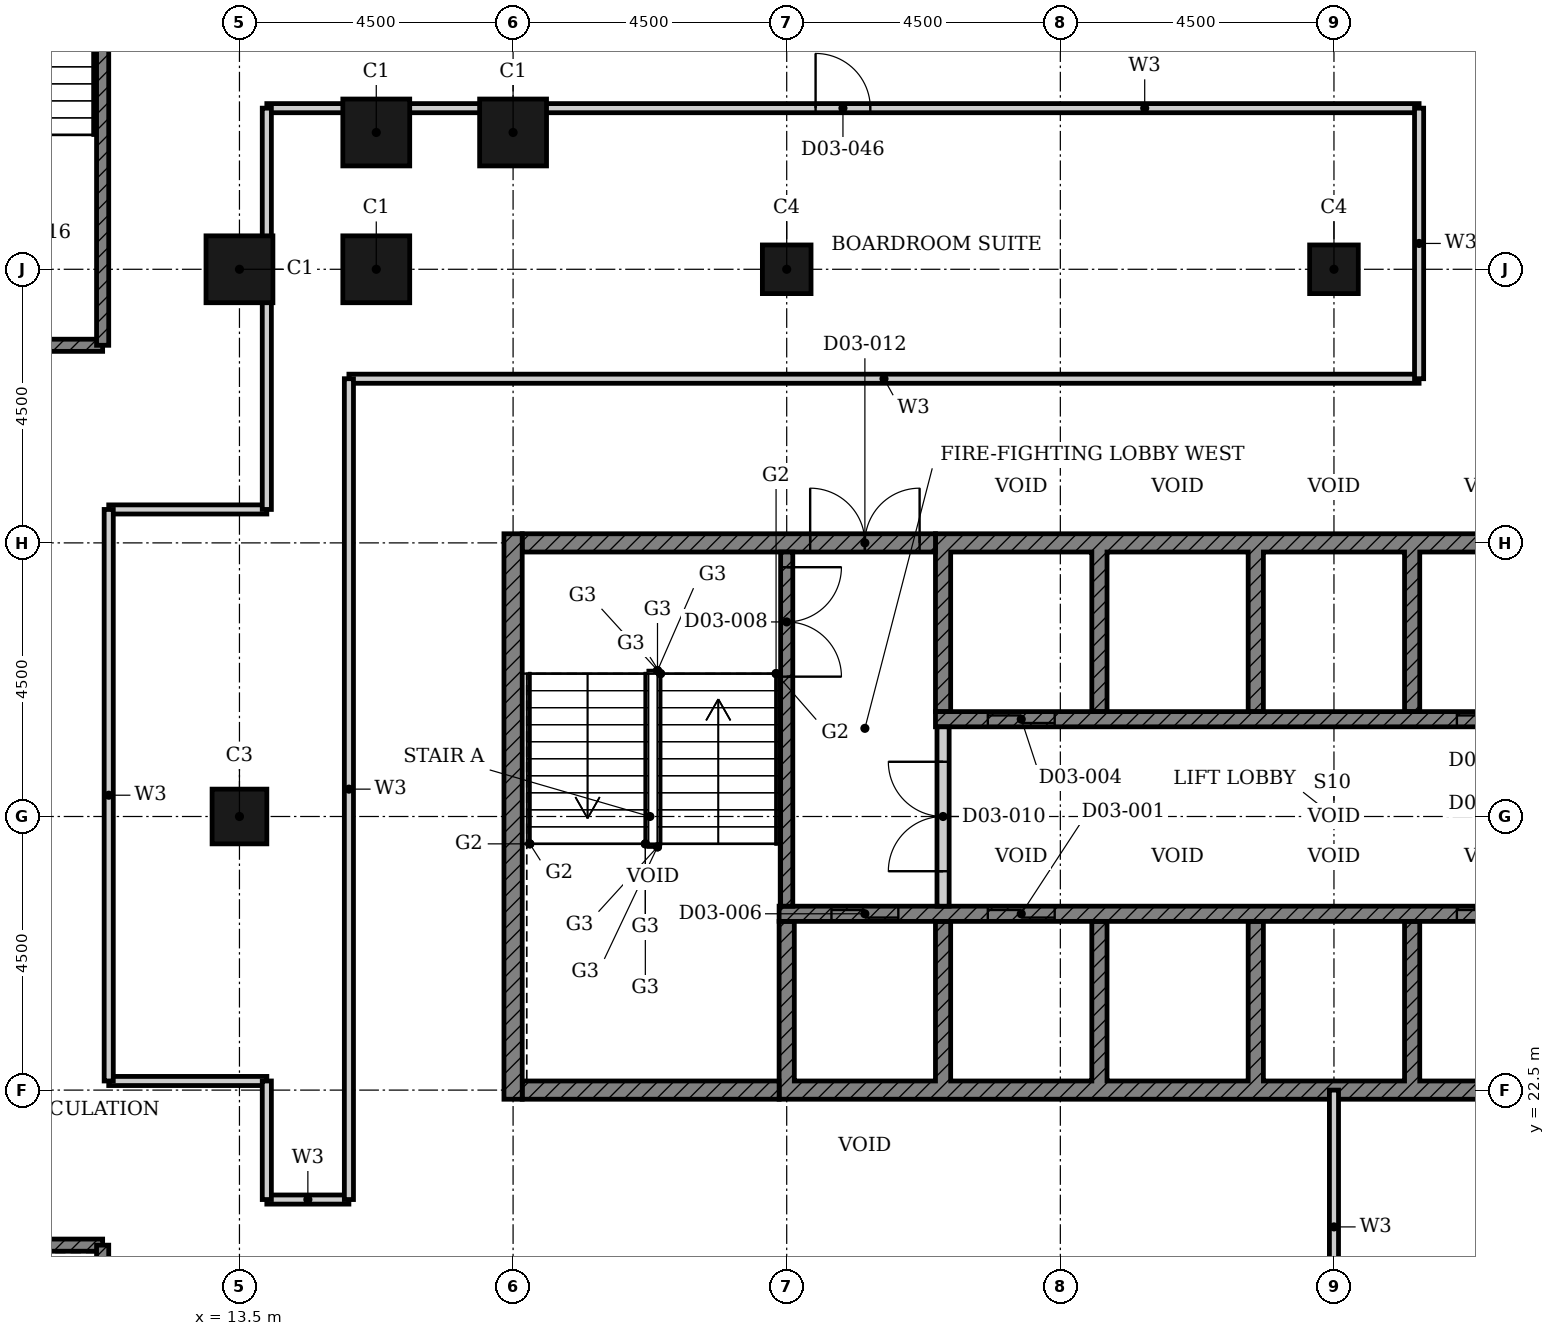
"""IFC4 building model, lengths in metres.
Left out: names, types, materials, properties, quantities, classifications, styles, units other than length and angle.
Written with IfcOpenShell. Run it as: python <this file> out.ifc"""

import sys

from ifc_helpers import new_model, si_unit, direction, frame, frame_2d, origin, origin_2d, place, context, subcontext, project, spatial, polyline, rectangle, hollow_rectangle, outline, extrude, element, fill, save


model = new_model("IFC4")
c1 = context("Model", 3, precision=1e-05, world=origin(), true_north=direction((0.0, 1.0)))
c2 = subcontext(c1, "Body", "Model", "MODEL_VIEW")
j1 = project(units=[si_unit("LENGTHUNIT", "METRE"), si_unit("PLANEANGLEUNIT", "RADIAN")], contexts=[c1])
p1 = place(None, origin())
s1 = spatial("IfcSite", under=j1, at=p1, CompositionType="ELEMENT")
p2 = place(p1, origin())
s2 = spatial("IfcBuilding", under=s1, at=p2, CompositionType="ELEMENT")
p3 = place(p2, frame((0.0, 0.0, 17.4)))
s3 = spatial("IfcBuildingStorey", under=s2, at=p3, CompositionType="ELEMENT", Elevation=17.4)
for number, where, z_axis, x_axis in (
    (1, (18.0, 38.25, 0.0), (0.0, 0.0, 1.0), (1.0, 0.0, 0.0)),
    (2, (15.75, 38.25, 0.0), (0.0, 0.0, 1.0), (1.0, 0.0, 0.0)),
    (3, (15.75, 36.0, 0.0), (0.0, 0.0, 1.0), (1.0, 0.0, 0.0)),
    (4, (13.5, 36.0, 0.0), (0.0, 0.0, 1.0), (1.0, 0.0, 0.0)),
):
    element("IfcColumn", number, at=place(p3, frame(where, z_axis=z_axis, x_axis=x_axis)), inside=s3, PredefinedType="COLUMN", context=c2, shape_type="SweptSolid", body=[
        extrude(hollow_rectangle(XDim=1.1, YDim=1.1, WallThickness=0.036, at=origin_2d()), origin(), (0.0, 0.0, 1.0), 6.6),
    ])
p4 = place(p3, frame((13.5, 27.0, 0.0), z_axis=(0.0, 0.0, 1.0), x_axis=(1.0, 0.0, 0.0)))
e5 = element("IfcColumn", 5, at=p4, inside=s3, PredefinedType="COLUMN", context=c2, shape_type="SweptSolid", body=[
    extrude(hollow_rectangle(XDim=0.9, YDim=0.9, WallThickness=0.028, at=origin_2d()), origin(), (0.0, 0.0, 1.0), 6.6),
])
for number, where, z_axis, x_axis in (
    (6, (22.5, 36.0, 0.0), (0.0, 0.0, 1.0), (1.0, 0.0, 0.0)),
    (7, (31.5, 36.0, 0.0), (0.0, 0.0, 1.0), (1.0, 0.0, 0.0)),
):
    element("IfcColumn", number, at=place(p3, frame(where, z_axis=z_axis, x_axis=x_axis)), inside=s3, PredefinedType="COLUMN", context=c2, shape_type="SweptSolid", body=[
        extrude(hollow_rectangle(XDim=0.8, YDim=0.8, WallThickness=0.025, at=origin_2d()), origin(), (0.0, 0.0, 1.0), 6.6),
    ])
p5 = place(p3, origin())
e8 = element("IfcWall", 8, at=p5, inside=s3, PredefinedType="SHEAR", context=c2, shape_type="SweptSolid", body=[
    extrude(outline(polyline([(22.375, 22.35), (38.053, 22.35), (38.053, 25.275), (37.803, 25.275), (37.803, 22.65), (35.482, 22.65), (35.482, 25.275), (35.232, 25.275), (35.232, 22.65), (32.911, 22.65), (32.911, 25.275), (32.661, 25.275), (32.661, 22.65), (30.339, 22.65), (30.339, 25.275), (30.089, 25.275), (30.089, 22.65), (27.768, 22.65), (27.768, 25.275), (27.518, 25.275), (27.518, 22.65), (25.197, 22.65), (25.197, 25.275), (24.947, 25.275), (24.947, 22.65), (22.625, 22.65), (22.625, 25.275), (22.375, 25.275), (22.375, 22.35)])), origin(), (0.0, 0.0, 1.0), 6.25),
])
p6 = place(p3, origin())
e9 = element("IfcWall", 9, at=p6, inside=s3, PredefinedType="SHEAR", context=c2, shape_type="SweptSolid", body=[
    extrude(outline(polyline([(24.947, 28.725), (25.197, 28.725), (25.197, 31.35), (27.518, 31.35), (27.518, 28.725), (27.768, 28.725), (27.768, 31.35), (30.089, 31.35), (30.089, 28.725), (30.339, 28.725), (30.339, 31.35), (32.661, 31.35), (32.661, 28.725), (32.911, 28.725), (32.911, 31.35), (35.232, 31.35), (35.232, 28.725), (35.482, 28.725), (35.482, 31.35), (37.803, 31.35), (37.803, 28.725), (38.053, 28.725), (38.053, 31.35), (40.375, 31.35), (40.375, 28.725), (40.625, 28.725), (40.625, 31.65), (24.947, 31.65), (24.947, 28.725)])), origin(), (0.0, 0.0, 1.0), 6.25),
])
p7 = place(p3, frame((18.15, 22.5, 0.0), z_axis=(0.0, 0.0, 1.0), x_axis=(1.0, 0.0, 0.0)))
e10 = element("IfcWall", 10, at=p7, inside=s3, PredefinedType="SHEAR", context=c2, shape_type="SweptSolid", body=[
    extrude(rectangle(XDim=4.225, YDim=0.3, at=frame_2d((2.113, 0.0))), origin(), (0.0, 0.0, 1.0), 6.25),
])
p8 = place(p3, frame((18.15, 31.5, 0.0), z_axis=(0.0, 0.0, 1.0), x_axis=(1.0, 0.0, 0.0)))
e11 = element("IfcWall", 11, at=p8, inside=s3, PredefinedType="SHEAR", context=c2, shape_type="SweptSolid", body=[
    extrude(rectangle(XDim=6.797, YDim=0.3, at=frame_2d((3.398, 0.0))), origin(), (0.0, 0.0, 1.0), 6.25),
])
p9 = place(p8, frame((4.736, 0.0, 0.0)))
e12 = element("IfcOpeningElement", 12, at=p9, cuts=e11, PredefinedType="OPENING", context=c2, shape_type="SweptSolid", body=[
    extrude(rectangle(XDim=1.8, YDim=2.1, at=frame_2d((0.9, 1.05))), frame((0.0, 0.16, 0.0), z_axis=(0.0, -1.0, 0.0), x_axis=(1.0, 0.0, 0.0)), (0.0, 0.0, 1.0), 0.32),
])
p10 = place(p3, frame((18.0, 22.35, 0.0), z_axis=(0.0, 0.0, 1.0), x_axis=(0.0, 1.0, 0.0)))
e13 = element("IfcWall", 13, at=p10, inside=s3, PredefinedType="SHEAR", context=c2, shape_type="SweptSolid", body=[
    extrude(rectangle(XDim=9.3, YDim=0.3, at=frame_2d((4.65, 0.0))), origin(), (0.0, 0.0, 1.0), 6.25),
])
p11 = place(p3, frame((22.375, 25.4, 0.0), z_axis=(0.0, 0.0, 1.0), x_axis=(1.0, 0.0, 0.0)))
e14 = element("IfcWall", 14, at=p11, inside=s3, PredefinedType="SHEAR", context=c2, shape_type="SweptSolid", body=[
    extrude(rectangle(XDim=15.678, YDim=0.25, at=frame_2d((7.839, 0.0))), origin(), (0.0, 0.0, 1.0), 6.25),
])
p12 = place(p11, frame((3.432, 0.0, 0.0)))
e15 = element("IfcOpeningElement", 15, at=p12, cuts=e14, PredefinedType="OPENING", context=c2, shape_type="SweptSolid", body=[
    extrude(rectangle(XDim=1.1, YDim=2.1, at=frame_2d((0.55, 1.05))), frame((0.0, 0.135, 0.0), z_axis=(0.0, -1.0, 0.0), x_axis=(1.0, 0.0, 0.0)), (0.0, 0.0, 1.0), 0.27),
])
p13 = place(p11, frame((11.146, 0.0, 0.0)))
e16 = element("IfcOpeningElement", 16, at=p13, cuts=e14, PredefinedType="OPENING", context=c2, shape_type="SweptSolid", body=[
    extrude(rectangle(XDim=1.1, YDim=2.1, at=frame_2d((0.55, 1.05))), frame((0.0, 0.135, 0.0), z_axis=(0.0, -1.0, 0.0), x_axis=(1.0, 0.0, 0.0)), (0.0, 0.0, 1.0), 0.27),
])
p14 = place(p11, frame((13.718, 0.0, 0.0)))
e17 = element("IfcOpeningElement", 17, at=p14, cuts=e14, PredefinedType="OPENING", context=c2, shape_type="SweptSolid", body=[
    extrude(rectangle(XDim=1.1, YDim=2.1, at=frame_2d((0.55, 1.05))), frame((0.0, 0.135, 0.0), z_axis=(0.0, -1.0, 0.0), x_axis=(1.0, 0.0, 0.0)), (0.0, 0.0, 1.0), 0.27),
])
p15 = place(p11, frame((0.861, 0.0, 0.0)))
e18 = element("IfcOpeningElement", 18, at=p15, cuts=e14, PredefinedType="OPENING", context=c2, shape_type="SweptSolid", body=[
    extrude(rectangle(XDim=1.1, YDim=2.1, at=frame_2d((0.55, 1.05))), frame((0.0, 0.135, 0.0), z_axis=(0.0, -1.0, 0.0), x_axis=(1.0, 0.0, 0.0)), (0.0, 0.0, 1.0), 0.27),
])
p16 = place(p3, frame((24.947, 28.6, 0.0), z_axis=(0.0, 0.0, 1.0), x_axis=(1.0, 0.0, 0.0)))
e19 = element("IfcWall", 19, at=p16, inside=s3, PredefinedType="SHEAR", context=c2, shape_type="SweptSolid", body=[
    extrude(rectangle(XDim=15.678, YDim=0.25, at=frame_2d((7.839, 0.0))), origin(), (0.0, 0.0, 1.0), 6.25),
])
p17 = place(p16, frame((0.861, 0.0, 0.0)))
e20 = element("IfcOpeningElement", 20, at=p17, cuts=e19, PredefinedType="OPENING", context=c2, shape_type="SweptSolid", body=[
    extrude(rectangle(XDim=1.1, YDim=2.1, at=frame_2d((0.55, 1.05))), frame((0.0, 0.135, 0.0), z_axis=(0.0, -1.0, 0.0), x_axis=(1.0, 0.0, 0.0)), (0.0, 0.0, 1.0), 0.27),
])
p18 = place(p16, frame((8.575, 0.0, 0.0)))
e21 = element("IfcOpeningElement", 21, at=p18, cuts=e19, PredefinedType="OPENING", context=c2, shape_type="SweptSolid", body=[
    extrude(rectangle(XDim=1.1, YDim=2.1, at=frame_2d((0.55, 1.05))), frame((0.0, 0.135, 0.0), z_axis=(0.0, -1.0, 0.0), x_axis=(1.0, 0.0, 0.0)), (0.0, 0.0, 1.0), 0.27),
])
p19 = place(p16, frame((13.718, 0.0, 0.0)))
e22 = element("IfcOpeningElement", 22, at=p19, cuts=e19, PredefinedType="OPENING", context=c2, shape_type="SweptSolid", body=[
    extrude(rectangle(XDim=1.1, YDim=2.1, at=frame_2d((0.55, 1.05))), frame((0.0, 0.135, 0.0), z_axis=(0.0, -1.0, 0.0), x_axis=(1.0, 0.0, 0.0)), (0.0, 0.0, 1.0), 0.27),
])
p20 = place(p3, frame((22.5, 31.35, 0.0), z_axis=(0.0, 0.0, 1.0), x_axis=(0.0, -1.0, 0.0)))
e23 = element("IfcWall", 23, at=p20, inside=s3, PredefinedType="SHEAR", context=c2, shape_type="SweptSolid", body=[
    extrude(rectangle(XDim=5.825, YDim=0.2, at=frame_2d((2.913, 0.0))), origin(), (0.0, 0.0, 1.0), 6.25),
])
p21 = place(p20, frame((0.25, 0.0, 0.0)))
e24 = element("IfcOpeningElement", 24, at=p21, cuts=e23, PredefinedType="OPENING", context=c2, shape_type="SweptSolid", body=[
    extrude(rectangle(XDim=1.8, YDim=2.1, at=frame_2d((0.9, 1.05))), frame((0.0, 0.11, 0.0), z_axis=(0.0, -1.0, 0.0), x_axis=(1.0, 0.0, 0.0)), (0.0, 0.0, 1.0), 0.22),
])
p22 = place(p3, frame((25.072, 25.525, 0.0), z_axis=(0.0, 0.0, 1.0), x_axis=(0.0, 1.0, 0.0)))
e25 = element("IfcWall", 25, at=p22, inside=s3, PredefinedType="PARTITIONING", context=c2, shape_type="SweptSolid", body=[
    extrude(rectangle(XDim=2.95, YDim=0.2, at=frame_2d((1.475, 0.0))), origin(), (0.0, 0.0, 1.0), 6.25),
])
p23 = place(p22, frame((0.575, 0.0, 0.0)))
e26 = element("IfcOpeningElement", 26, at=p23, cuts=e25, PredefinedType="OPENING", context=c2, shape_type="SweptSolid", body=[
    extrude(rectangle(XDim=1.8, YDim=2.1, at=frame_2d((0.9, 1.05))), frame((0.0, 0.11, 0.0), z_axis=(0.0, -1.0, 0.0), x_axis=(1.0, 0.0, 0.0)), (0.0, 0.0, 1.0), 0.22),
])
p24 = place(p3, frame((13.95, 20.7, 0.0), z_axis=(0.0, 0.0, 1.0), x_axis=(1.0, 0.0, 0.0)))
e27 = element("IfcWall", 27, at=p24, inside=s3, PredefinedType="PARTITIONING", context=c2, shape_type="SweptSolid", body=[
    extrude(rectangle(XDim=1.35, YDim=0.15, at=frame_2d((0.675, 0.0))), origin(), (0.0, 0.0, 1.0), 6.25),
])
for number, where, z_axis, x_axis in (
    (28, (11.35, 22.65, 0.0), (0.0, 0.0, 1.0), (1.0, 0.0, 0.0)),
    (29, (11.35, 32.05, 0.0), (0.0, 0.0, 1.0), (1.0, 0.0, 0.0)),
):
    element("IfcWall", number, at=place(p3, frame(where, z_axis=z_axis, x_axis=x_axis)), inside=s3, PredefinedType="PARTITIONING", context=c2, shape_type="SweptSolid", body=[
        extrude(rectangle(XDim=2.6, YDim=0.15, at=frame_2d((1.3, 0.0))), origin(), (0.0, 0.0, 1.0), 6.25),
    ])
p25 = place(p3, frame((15.3, 34.2, 0.0), z_axis=(0.0, 0.0, 1.0), x_axis=(1.0, 0.0, 0.0)))
e30 = element("IfcWall", 30, at=p25, inside=s3, PredefinedType="PARTITIONING", context=c2, shape_type="SweptSolid", body=[
    extrude(rectangle(XDim=17.6, YDim=0.15, at=frame_2d((8.8, 0.0))), origin(), (0.0, 0.0, 1.0), 6.25),
])
p26 = place(p3, frame((13.95, 38.65, 0.0), z_axis=(0.0, 0.0, 1.0), x_axis=(1.0, 0.0, 0.0)))
e31 = element("IfcWall", 31, at=p26, inside=s3, PredefinedType="PARTITIONING", context=c2, shape_type="SweptSolid", body=[
    extrude(rectangle(XDim=18.95, YDim=0.15, at=frame_2d((9.475, 0.0))), origin(), (0.0, 0.0, 1.0), 6.25),
])
p27 = place(p26, frame((9.025, 0.0, 0.0)))
e32 = element("IfcOpeningElement", 32, at=p27, cuts=e31, PredefinedType="OPENING", context=c2, shape_type="SweptSolid", body=[
    extrude(rectangle(XDim=0.9, YDim=2.1, at=frame_2d((0.45, 1.05))), frame((0.0, 0.085, 0.0), z_axis=(0.0, -1.0, 0.0), x_axis=(1.0, 0.0, 0.0)), (0.0, 0.0, 1.0), 0.17),
])
p28 = place(p3, frame((11.35, 22.65, 0.0), z_axis=(0.0, 0.0, 1.0), x_axis=(0.0, 1.0, 0.0)))
e33 = element("IfcWall", 33, at=p28, inside=s3, PredefinedType="PARTITIONING", context=c2, shape_type="SweptSolid", body=[
    extrude(rectangle(XDim=9.4, YDim=0.15, at=frame_2d((4.7, 0.0))), origin(), (0.0, 0.0, 1.0), 6.25),
])
p29 = place(p3, frame((13.95, 20.7, 0.0), z_axis=(0.0, 0.0, 1.0), x_axis=(0.0, 1.0, 0.0)))
e34 = element("IfcWall", 34, at=p29, inside=s3, PredefinedType="PARTITIONING", context=c2, shape_type="SweptSolid", body=[
    extrude(rectangle(XDim=1.95, YDim=0.15, at=frame_2d((0.975, 0.0))), origin(), (0.0, 0.0, 1.0), 6.25),
])
p30 = place(p3, frame((13.95, 32.05, 0.0), z_axis=(0.0, 0.0, 1.0), x_axis=(0.0, 1.0, 0.0)))
e35 = element("IfcWall", 35, at=p30, inside=s3, PredefinedType="PARTITIONING", context=c2, shape_type="SweptSolid", body=[
    extrude(rectangle(XDim=6.6, YDim=0.15, at=frame_2d((3.3, 0.0))), origin(), (0.0, 0.0, 1.0), 6.25),
])
p31 = place(p3, frame((15.3, 20.7, 0.0), z_axis=(0.0, 0.0, 1.0), x_axis=(0.0, 1.0, 0.0)))
e36 = element("IfcWall", 36, at=p31, inside=s3, PredefinedType="PARTITIONING", context=c2, shape_type="SweptSolid", body=[
    extrude(rectangle(XDim=13.5, YDim=0.15, at=frame_2d((6.75, 0.0))), origin(), (0.0, 0.0, 1.0), 6.25),
])
p32 = place(p3, frame((31.5, 18.0, 0.0), z_axis=(0.0, 0.0, 1.0), x_axis=(0.0, 1.0, 0.0)))
e37 = element("IfcWall", 37, at=p32, inside=s3, PredefinedType="PARTITIONING", context=c2, shape_type="SweptSolid", body=[
    extrude(rectangle(XDim=4.5, YDim=0.15, at=frame_2d((2.25, 0.0))), origin(), (0.0, 0.0, 1.0), 6.25),
])
p33 = place(p3, frame((32.9, 34.2, 0.0), z_axis=(0.0, 0.0, 1.0), x_axis=(0.0, 1.0, 0.0)))
e38 = element("IfcWall", 38, at=p33, inside=s3, PredefinedType="PARTITIONING", context=c2, shape_type="SweptSolid", body=[
    extrude(rectangle(XDim=4.45, YDim=0.15, at=frame_2d((2.225, 0.0))), origin(), (0.0, 0.0, 1.0), 6.25),
])
for number, where, z_axis, x_axis in (
    (39, (6.75, 19.95, 0.0), (0.0, 0.0, 1.0), (1.0, 0.0, 0.0)),
    (40, (6.75, 34.75, 0.0), (0.0, 0.0, 1.0), (1.0, 0.0, 0.0)),
):
    element("IfcWall", number, at=place(p3, frame(where, z_axis=z_axis, x_axis=x_axis)), inside=s3, PredefinedType="SHEAR", context=c2, shape_type="SweptSolid", body=[
        extrude(rectangle(XDim=4.5, YDim=0.2, at=frame_2d((2.25, 0.0))), origin(), (0.0, 0.0, 1.0), 6.25),
    ])
for number, where, z_axis, x_axis in (
    (41, (11.25, 34.75, 0.0), (0.0, 0.0, 1.0), (0.0, 1.0, 0.0)),
    (42, (11.25, 11.5, 0.0), (0.0, 0.0, 1.0), (0.0, 1.0, 0.0)),
):
    element("IfcWall", number, at=place(p3, frame(where, z_axis=z_axis, x_axis=x_axis)), inside=s3, PredefinedType="SHEAR", context=c2, shape_type="SweptSolid", body=[
        extrude(rectangle(XDim=8.45, YDim=0.2, at=frame_2d((4.225, 0.0))), origin(), (0.0, 0.0, 1.0), 6.25),
    ])
p34 = place(p12, origin())
e43 = element("IfcDoor", 43, at=p34, inside=s3, OperationType="DOUBLE_DOOR_SLIDING", PredefinedType="DOOR", context=c2, shape_type="SweptSolid", body=[
    extrude(rectangle(XDim=1.1, YDim=2.1, at=frame_2d((0.55, 1.05))), frame((0.0, 0.025, 0.0), z_axis=(0.0, -1.0, 0.0), x_axis=(1.0, 0.0, 0.0)), (0.0, 0.0, 1.0), 0.05),
])
fill(e15, e43)
p35 = place(p13, origin())
e44 = element("IfcDoor", 44, at=p35, inside=s3, OperationType="DOUBLE_DOOR_SLIDING", PredefinedType="DOOR", context=c2, shape_type="SweptSolid", body=[
    extrude(rectangle(XDim=1.1, YDim=2.1, at=frame_2d((0.55, 1.05))), frame((0.0, 0.025, 0.0), z_axis=(0.0, -1.0, 0.0), x_axis=(1.0, 0.0, 0.0)), (0.0, 0.0, 1.0), 0.05),
])
fill(e16, e44)
p36 = place(p17, origin())
e45 = element("IfcDoor", 45, at=p36, inside=s3, OperationType="DOUBLE_DOOR_SLIDING", PredefinedType="DOOR", context=c2, shape_type="SweptSolid", body=[
    extrude(rectangle(XDim=1.1, YDim=2.1, at=frame_2d((0.55, 1.05))), frame((0.0, 0.025, 0.0), z_axis=(0.0, -1.0, 0.0), x_axis=(1.0, 0.0, 0.0)), (0.0, 0.0, 1.0), 0.05),
])
fill(e20, e45)
p37 = place(p18, origin())
e46 = element("IfcDoor", 46, at=p37, inside=s3, OperationType="DOUBLE_DOOR_SLIDING", PredefinedType="DOOR", context=c2, shape_type="SweptSolid", body=[
    extrude(rectangle(XDim=1.1, YDim=2.1, at=frame_2d((0.55, 1.05))), frame((0.0, 0.025, 0.0), z_axis=(0.0, -1.0, 0.0), x_axis=(1.0, 0.0, 0.0)), (0.0, 0.0, 1.0), 0.05),
])
fill(e21, e46)
p38 = place(p15, origin())
e47 = element("IfcDoor", 47, at=p38, inside=s3, OperationType="DOUBLE_DOOR_SLIDING", PredefinedType="DOOR", context=c2, shape_type="SweptSolid", body=[
    extrude(rectangle(XDim=1.1, YDim=2.1, at=frame_2d((0.55, 1.05))), frame((0.0, 0.025, 0.0), z_axis=(0.0, -1.0, 0.0), x_axis=(1.0, 0.0, 0.0)), (0.0, 0.0, 1.0), 0.05),
])
fill(e18, e47)
p39 = place(p21, origin())
e48 = element("IfcDoor", 48, at=p39, inside=s3, OperationType="DOUBLE_DOOR_SINGLE_SWING", PredefinedType="DOOR", context=c2, shape_type="SweptSolid", body=[
    extrude(rectangle(XDim=1.8, YDim=2.1, at=frame_2d((0.9, 1.05))), frame((0.0, 0.025, 0.0), z_axis=(0.0, -1.0, 0.0), x_axis=(1.0, 0.0, 0.0)), (0.0, 0.0, 1.0), 0.05),
])
fill(e24, e48)
p40 = place(p23, origin())
e49 = element("IfcDoor", 49, at=p40, inside=s3, OperationType="DOUBLE_DOOR_SINGLE_SWING", PredefinedType="DOOR", context=c2, shape_type="SweptSolid", body=[
    extrude(rectangle(XDim=1.8, YDim=2.1, at=frame_2d((0.9, 1.05))), frame((0.0, 0.025, 0.0), z_axis=(0.0, -1.0, 0.0), x_axis=(1.0, 0.0, 0.0)), (0.0, 0.0, 1.0), 0.05),
])
fill(e26, e49)
p41 = place(p9, origin())
e50 = element("IfcDoor", 50, at=p41, inside=s3, OperationType="DOUBLE_DOOR_SINGLE_SWING", PredefinedType="DOOR", context=c2, shape_type="SweptSolid", body=[
    extrude(rectangle(XDim=1.8, YDim=2.1, at=frame_2d((0.9, 1.05))), frame((0.0, 0.025, 0.0), z_axis=(0.0, -1.0, 0.0), x_axis=(1.0, 0.0, 0.0)), (0.0, 0.0, 1.0), 0.05),
])
fill(e12, e50)
p42 = place(p27, origin())
e51 = element("IfcDoor", 51, at=p42, inside=s3, OperationType="SINGLE_SWING_RIGHT", PredefinedType="DOOR", context=c2, shape_type="SweptSolid", body=[
    extrude(rectangle(XDim=0.9, YDim=2.1, at=frame_2d((0.45, 1.05))), frame((0.0, 0.025, 0.0), z_axis=(0.0, -1.0, 0.0), x_axis=(1.0, 0.0, 0.0)), (0.0, 0.0, 1.0), 0.05),
])
fill(e32, e51)
save(model, sys.argv[1])
